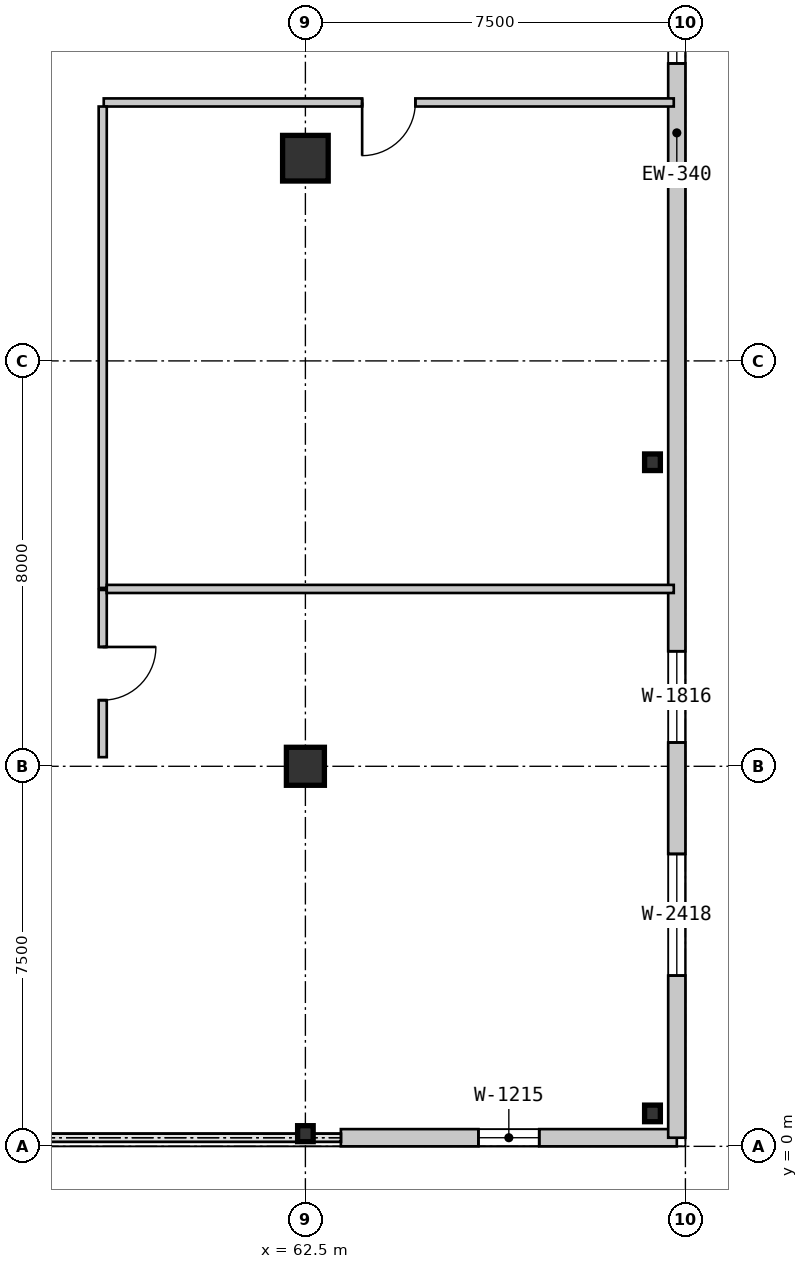
"""IFC4 building model, lengths in metres.
Left out: names, types, materials, properties, quantities, classifications, styles, units other than length and angle.
Written with IfcOpenShell. Run it as: python <this file> out.ifc"""

import sys

from ifc_helpers import new_model, si_unit, direction, frame, frame_2d, origin, origin_2d, place, context, subcontext, project, spatial, rectangle, circle, i_section, extrude, source, transform, mapped, element, fill, save


model = new_model("IFC4")
c1 = context("Model", 3, precision=1e-05, world=origin(), true_north=direction((0.0, 1.0)))
c2 = subcontext(c1, "Body", "Model", "MODEL_VIEW")
j1 = project(units=[si_unit("LENGTHUNIT", "METRE"), si_unit("PLANEANGLEUNIT", "RADIAN")], contexts=[c1])
p1 = place(None, origin())
s1 = spatial("IfcSite", under=j1, at=p1, CompositionType="ELEMENT")
p2 = place(p1, origin())
s2 = spatial("IfcBuilding", under=s1, at=p2, CompositionType="ELEMENT")
p3 = place(p2, frame((0.0, 0.0, 4.55)))
s3 = spatial("IfcBuildingStorey", under=s2, at=p3, CompositionType="ELEMENT", Elevation=4.55)
m1 = source(origin(), c2, "Body", "SweptSolid", [
    extrude(circle(Radius=0.375, at=origin_2d()), origin(), (0.0, 0.0, 1.0), 3.85),
])
p4 = place(p3, frame((62.5, 7.5, 0.0), z_axis=(0.0, 0.0, 1.0), x_axis=(1.0, 0.0, 0.0)))
e1 = element("IfcColumn", 1, at=p4, inside=s3, PredefinedType="COLUMN", context=c2, shape_type="MappedRepresentation", body=[
    mapped(m1, transform((0.0, 0.0, 0.0), scale=1.0)),
])
m2 = source(origin(), c2, "Body", "SweptSolid", [
    extrude(circle(Radius=0.45, at=origin_2d()), origin(), (0.0, 0.0, 1.0), 3.85),
])
p5 = place(p3, frame((62.5, 19.5, 0.0), z_axis=(0.0, 0.0, 1.0), x_axis=(1.0, 0.0, 0.0)))
e2 = element("IfcColumn", 2, at=p5, inside=s3, PredefinedType="COLUMN", context=c2, shape_type="MappedRepresentation", body=[
    mapped(m2, transform((0.0, 0.0, 0.0), scale=1.0)),
])
m3 = source(origin(), c2, "Body", "SweptSolid", [
    extrude(i_section(OverallWidth=0.311, OverallDepth=0.327, WebThickness=0.016, FlangeThickness=0.025, at=origin_2d()), origin(), (0.0, 0.0, 1.0), 3.85),
])
for number, where, z_axis, x_axis in (
    (3, (69.35, 0.65, 0.0), (0.0, 0.0, 1.0), (1.0, 0.0, 0.0)),
    (4, (69.35, 13.5, 0.0), (0.0, 0.0, 1.0), (1.0, 0.0, 0.0)),
):
    element("IfcColumn", number, at=place(p3, frame(where, z_axis=z_axis, x_axis=x_axis)), inside=s3, PredefinedType="COLUMN", context=c2, shape_type="MappedRepresentation", body=[
        mapped(m3, transform((0.0, 0.0, 0.0), scale=1.0)),
    ])
m4 = source(origin(), c2, "Body", "SweptSolid", [
    extrude(i_section(OverallWidth=0.307, OverallDepth=0.315, WebThickness=0.012, FlangeThickness=0.019, at=origin_2d()), origin(), (0.0, 0.0, 1.0), 3.85),
])
p6 = place(p3, frame((62.5, 0.25, 0.0), z_axis=(0.0, 0.0, 1.0), x_axis=(1.0, 0.0, 0.0)))
e5 = element("IfcColumn", 5, at=p6, inside=s3, PredefinedType="PILASTER", context=c2, shape_type="MappedRepresentation", body=[
    mapped(m4, transform((0.0, 0.0, 0.0), scale=1.0)),
])
m5 = source(origin(), c2, "Body", "SweptSolid", [
    extrude(rectangle(XDim=6.63, YDim=0.34, at=frame_2d((3.315, 0.0))), origin(), (0.0, 0.0, 1.0), 3.59),
])
p7 = place(p3, frame((63.2, 0.17, 0.0), z_axis=(0.0, 0.0, 1.0), x_axis=(1.0, 0.0, 0.0)))
e6 = element("IfcWall", 6, at=p7, inside=s3, PredefinedType="SOLIDWALL", context=c2, shape_type="MappedRepresentation", body=[
    mapped(m5, transform((0.0, 0.0, 0.0), scale=1.0)),
])
m6 = source(origin(), c2, "Body", "SweptSolid", [
    extrude(rectangle(XDim=1.2, YDim=1.5, at=frame_2d((0.6, 0.75))), frame((0.0, 0.18, 0.0), z_axis=(0.0, -1.0, 0.0), x_axis=(1.0, 0.0, 0.0)), (0.0, 0.0, 1.0), 0.36),
])
p8 = place(p7, frame((2.715, 0.0, 0.9)))
e7 = element("IfcOpeningElement", 7, at=p8, cuts=e6, PredefinedType="OPENING", context=c2, shape_type="MappedRepresentation", body=[
    mapped(m6, transform((0.0, 0.0, 0.0), scale=1.0)),
])
m7 = source(origin(), c2, "Body", "SweptSolid", [
    extrude(rectangle(XDim=39.66, YDim=0.34, at=frame_2d((19.83, 0.0))), origin(), (0.0, 0.0, 1.0), 3.59),
])
p9 = place(p3, frame((69.83, 0.17, 0.0), z_axis=(0.0, 0.0, 1.0), x_axis=(0.0, 1.0, 0.0)))
e8 = element("IfcWall", 8, at=p9, inside=s3, PredefinedType="SOLIDWALL", context=c2, shape_type="MappedRepresentation", body=[
    mapped(m7, transform((0.0, 0.0, 0.0), scale=1.0)),
])
m8 = source(origin(), c2, "Body", "SweptSolid", [
    extrude(rectangle(XDim=2.4, YDim=1.8, at=frame_2d((1.2, 0.9))), frame((0.0, 0.18, 0.0), z_axis=(0.0, -1.0, 0.0), x_axis=(1.0, 0.0, 0.0)), (0.0, 0.0, 1.0), 0.36),
])
p10 = place(p9, frame((3.2, 0.0, 0.95)))
e9 = element("IfcOpeningElement", 9, at=p10, cuts=e8, PredefinedType="OPENING", context=c2, shape_type="MappedRepresentation", body=[
    mapped(m8, transform((0.0, 0.0, 0.0), scale=1.0)),
])
m9 = source(origin(), c2, "Body", "SweptSolid", [
    extrude(rectangle(XDim=1.8, YDim=1.6, at=frame_2d((0.9, 0.8))), frame((0.0, 0.18, 0.0), z_axis=(0.0, -1.0, 0.0), x_axis=(1.0, 0.0, 0.0)), (0.0, 0.0, 1.0), 0.36),
])
p11 = place(p9, frame((7.8, 0.0, 0.95)))
e10 = element("IfcOpeningElement", 10, at=p11, cuts=e8, PredefinedType="OPENING", context=c2, shape_type="MappedRepresentation", body=[
    mapped(m9, transform((0.0, 0.0, 0.0), scale=1.0)),
])
m10 = source(origin(), c2, "Body", "SweptSolid", [
    extrude(rectangle(XDim=1.5, YDim=1.5, at=frame_2d((0.75, 0.75))), frame((0.0, 0.18, 0.0), z_axis=(0.0, -1.0, 0.0), x_axis=(1.0, 0.0, 0.0)), (0.0, 0.0, 1.0), 0.36),
])
p12 = place(p9, frame((21.2, 0.0, 0.95)))
e11 = element("IfcOpeningElement", 11, at=p12, cuts=e8, PredefinedType="OPENING", context=c2, shape_type="MappedRepresentation", body=[
    mapped(m10, transform((0.0, 0.0, 0.0), scale=1.0)),
])
p13 = place(p9, frame((34.6, 0.0, 0.95)))
e12 = element("IfcOpeningElement", 12, at=p13, cuts=e8, PredefinedType="OPENING", context=c2, shape_type="MappedRepresentation", body=[
    mapped(m6, transform((0.0, 0.0, 0.0), scale=1.0)),
])
m11 = source(origin(), c2, "Body", "SweptSolid", [
    extrude(rectangle(XDim=3.3, YDim=0.16, at=frame_2d((1.65, 0.0))), origin(), (0.0, 0.0, 1.0), 3.59),
])
p14 = place(p3, frame((58.5, 10.98, 0.0), z_axis=(0.0, 0.0, 1.0), x_axis=(0.0, -1.0, 0.0)))
e13 = element("IfcWall", 13, at=p14, inside=s3, PredefinedType="PARTITIONING", context=c2, shape_type="MappedRepresentation", body=[
    mapped(m11, transform((0.0, 0.0, 0.0), scale=1.0)),
])
m12 = source(origin(), c2, "Body", "SweptSolid", [
    extrude(rectangle(XDim=1.05, YDim=2.1, at=frame_2d((0.525, 1.05))), frame((0.0, 0.09, 0.0), z_axis=(0.0, -1.0, 0.0), x_axis=(1.0, 0.0, 0.0)), (0.0, 0.0, 1.0), 0.18),
])
p15 = place(p14, frame((1.125, 0.0, 0.0)))
e14 = element("IfcOpeningElement", 14, at=p15, cuts=e13, PredefinedType="OPENING", context=c2, shape_type="MappedRepresentation", body=[
    mapped(m12, transform((0.0, 0.0, 0.0), scale=1.0)),
])
m13 = source(origin(), c2, "Body", "SweptSolid", [
    extrude(rectangle(XDim=11.25, YDim=0.16, at=frame_2d((5.625, 0.0))), origin(), (0.0, 0.0, 1.0), 3.59),
])
p16 = place(p3, frame((69.77, 20.6, 0.0), z_axis=(0.0, 0.0, 1.0), x_axis=(-1.0, 0.0, 0.0)))
e15 = element("IfcWall", 15, at=p16, inside=s3, PredefinedType="PARTITIONING", context=c2, shape_type="MappedRepresentation", body=[
    mapped(m13, transform((0.0, 0.0, 0.0), scale=1.0)),
])
p17 = place(p16, frame((5.1, 0.0, 0.0)))
e16 = element("IfcOpeningElement", 16, at=p17, cuts=e15, PredefinedType="OPENING", context=c2, shape_type="MappedRepresentation", body=[
    mapped(m12, transform((0.0, 0.0, 0.0), scale=1.0)),
])
m14 = source(origin(), c2, "Body", "SweptSolid", [
    extrude(rectangle(XDim=9.5, YDim=0.16, at=frame_2d((4.75, 0.0))), origin(), (0.0, 0.0, 1.0), 3.59),
])
p18 = place(p3, frame((58.5, 20.52, 0.0), z_axis=(0.0, 0.0, 1.0), x_axis=(0.0, -1.0, 0.0)))
e17 = element("IfcWall", 17, at=p18, inside=s3, PredefinedType="PARTITIONING", context=c2, shape_type="MappedRepresentation", body=[
    mapped(m14, transform((0.0, 0.0, 0.0), scale=1.0)),
])
m15 = source(origin(), c2, "Body", "SweptSolid", [
    extrude(rectangle(XDim=11.19, YDim=0.16, at=frame_2d((5.595, 0.0))), origin(), (0.0, 0.0, 1.0), 3.59),
])
p19 = place(p3, frame((58.58, 11.0, 0.0), z_axis=(0.0, 0.0, 1.0), x_axis=(1.0, 0.0, 0.0)))
e18 = element("IfcWall", 18, at=p19, inside=s3, PredefinedType="PARTITIONING", context=c2, shape_type="MappedRepresentation", body=[
    mapped(m15, transform((0.0, 0.0, 0.0), scale=1.0)),
])
m16 = source(origin(), c2, "Body", "SweptSolid", [
    extrude(rectangle(XDim=1.2, YDim=1.5, at=frame_2d((0.6, 0.75))), frame((0.0, 0.03, 0.0), z_axis=(0.0, -1.0, 0.0), x_axis=(1.0, 0.0, 0.0)), (0.0, 0.0, 1.0), 0.06),
])
p20 = place(p8, origin())
e19 = element("IfcWindow", 19, at=p20, inside=s3, PartitioningType="SINGLE_PANEL", PredefinedType="WINDOW", context=c2, shape_type="MappedRepresentation", body=[
    mapped(m16, transform((0.0, 0.0, 0.0), scale=1.0)),
])
fill(e7, e19)
m17 = source(origin(), c2, "Body", "SweptSolid", [
    extrude(rectangle(XDim=2.4, YDim=1.8, at=frame_2d((1.2, 0.9))), frame((0.0, 0.03, 0.0), z_axis=(0.0, -1.0, 0.0), x_axis=(1.0, 0.0, 0.0)), (0.0, 0.0, 1.0), 0.06),
])
p21 = place(p10, origin())
e20 = element("IfcWindow", 20, at=p21, inside=s3, PartitioningType="SINGLE_PANEL", PredefinedType="WINDOW", context=c2, shape_type="MappedRepresentation", body=[
    mapped(m17, transform((0.0, 0.0, 0.0), scale=1.0)),
])
fill(e9, e20)
m18 = source(origin(), c2, "Body", "SweptSolid", [
    extrude(rectangle(XDim=1.8, YDim=1.6, at=frame_2d((0.9, 0.8))), frame((0.0, 0.03, 0.0), z_axis=(0.0, -1.0, 0.0), x_axis=(1.0, 0.0, 0.0)), (0.0, 0.0, 1.0), 0.06),
])
p22 = place(p11, origin())
e21 = element("IfcWindow", 21, at=p22, inside=s3, PartitioningType="SINGLE_PANEL", PredefinedType="WINDOW", context=c2, shape_type="MappedRepresentation", body=[
    mapped(m18, transform((0.0, 0.0, 0.0), scale=1.0)),
])
fill(e10, e21)
m19 = source(origin(), c2, "Body", "SweptSolid", [
    extrude(rectangle(XDim=1.5, YDim=1.5, at=frame_2d((0.75, 0.75))), frame((0.0, 0.03, 0.0), z_axis=(0.0, -1.0, 0.0), x_axis=(1.0, 0.0, 0.0)), (0.0, 0.0, 1.0), 0.06),
])
p23 = place(p12, origin())
e22 = element("IfcWindow", 22, at=p23, inside=s3, PartitioningType="SINGLE_PANEL", PredefinedType="WINDOW", context=c2, shape_type="MappedRepresentation", body=[
    mapped(m19, transform((0.0, 0.0, 0.0), scale=1.0)),
])
fill(e11, e22)
m20 = source(origin(), c2, "Body", "SweptSolid", [
    extrude(rectangle(XDim=1.05, YDim=2.1, at=frame_2d((0.525, 1.05))), frame((0.0, 0.025, 0.0), z_axis=(0.0, -1.0, 0.0), x_axis=(1.0, 0.0, 0.0)), (0.0, 0.0, 1.0), 0.05),
])
p24 = place(p15, origin())
e23 = element("IfcDoor", 23, at=p24, inside=s3, OperationType="SINGLE_SWING_LEFT", PredefinedType="DOOR", context=c2, shape_type="MappedRepresentation", body=[
    mapped(m20, transform((0.0, 0.0, 0.0), scale=1.0)),
])
fill(e14, e23)
p25 = place(p17, origin())
e24 = element("IfcDoor", 24, at=p25, inside=s3, OperationType="SINGLE_SWING_RIGHT", PredefinedType="DOOR", context=c2, shape_type="MappedRepresentation", body=[
    mapped(m20, transform((0.0, 0.0, 0.0), scale=1.0)),
])
fill(e16, e24)
save(model, sys.argv[1])
